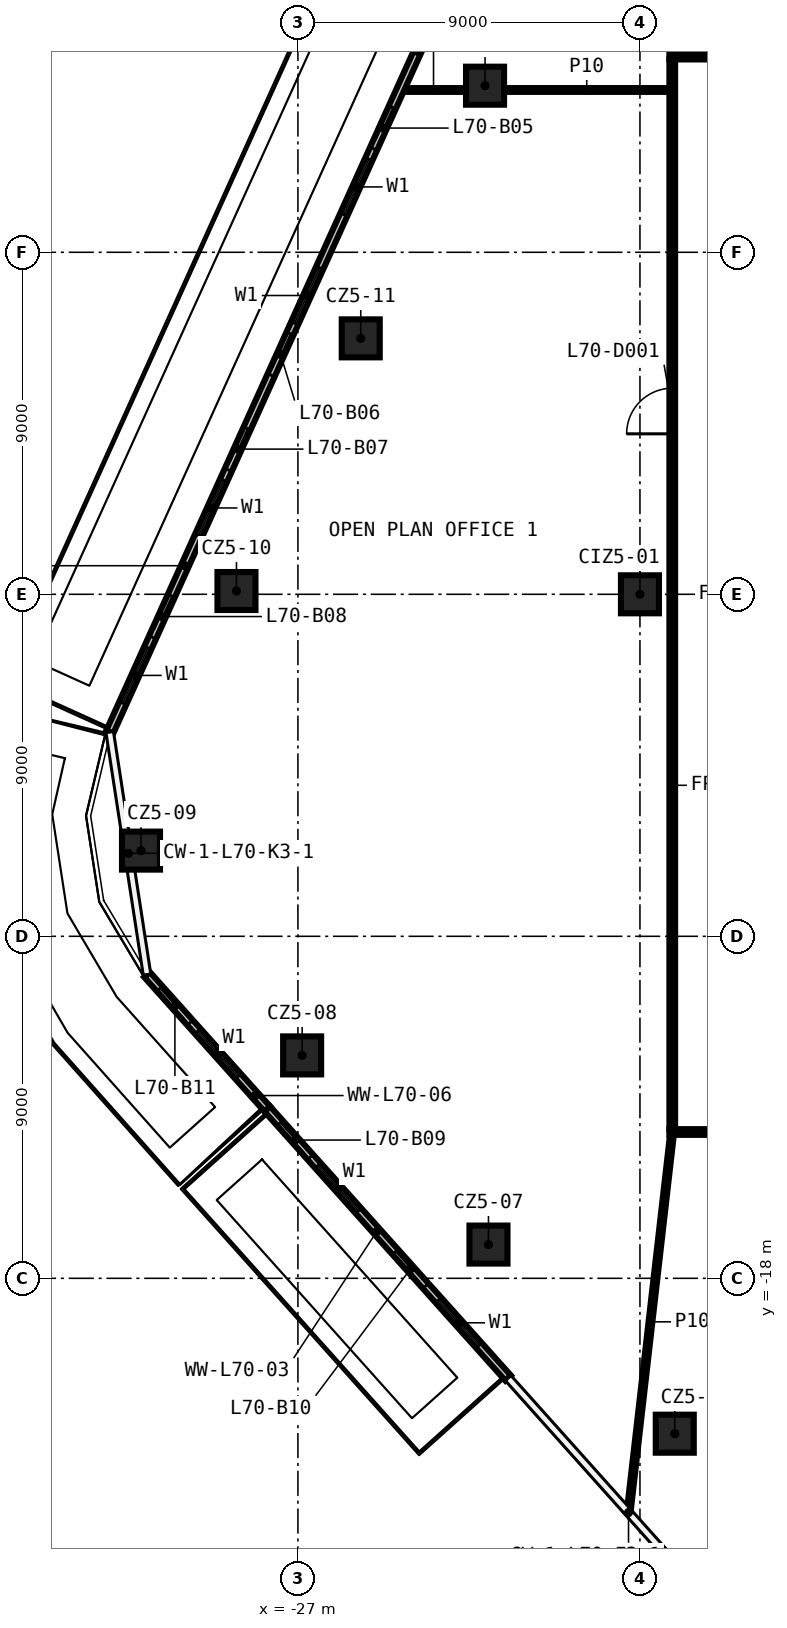
"""IFC4 building model, lengths in metres.
Left out: names, types, materials, properties, quantities, classifications, styles, units other than length and angle.
Written with IfcOpenShell. Run it as: python <this file> out.ifc"""

import sys

from ifc_helpers import new_model, si_unit, direction, frame, frame_2d, origin, origin_2d, place, context, subcontext, project, spatial, rectangle, extrude, element, fill, save


model = new_model("IFC4")
c1 = context("Model", 3, precision=1e-05, world=origin(), true_north=direction((0.0, 1.0)))
c2 = subcontext(c1, "Body", "Model", "MODEL_VIEW")
j1 = project(units=[si_unit("LENGTHUNIT", "METRE"), si_unit("PLANEANGLEUNIT", "RADIAN")], contexts=[c1])
p1 = place(None, origin())
s1 = spatial("IfcSite", under=j1, at=p1, CompositionType="ELEMENT")
p2 = place(p1, origin())
s2 = spatial("IfcBuilding", under=s1, at=p2, CompositionType="ELEMENT")
p3 = place(p2, frame((0.0, 0.0, 327.8)))
s3 = spatial("IfcBuildingStorey", under=s2, at=p3, CompositionType="ELEMENT", Elevation=327.8)
for number, where, z_axis, x_axis in (
    (1, (-17.084, -22.089, 0.0), (0.0, 0.0, 1.0), (1.0, 0.0, 0.0)),
    (2, (-21.986, -17.112, 0.0), (0.0, 0.0, 1.0), (1.0, 0.0, 0.0)),
    (3, (-26.889, -12.134, 0.0), (0.0, 0.0, 1.0), (1.0, 0.0, 0.0)),
    (4, (-31.129, -6.745, 0.0), (0.0, 0.0, 1.0), (1.0, 0.0, 0.0)),
    (5, (-28.617, 0.086, 0.0), (0.0, 0.0, 1.0), (1.0, 0.0, 0.0)),
    (6, (-25.347, 6.735, 0.0), (0.0, 0.0, 1.0), (1.0, 0.0, 0.0)),
    (7, (-22.076, 13.384, 0.0), (0.0, 0.0, 1.0), (1.0, 0.0, 0.0)),
    (8, (-18.0, 0.0, 0.0), (0.0, 0.0, 1.0), (1.0, 0.0, 0.0)),
):
    element("IfcColumn", number, at=place(p3, frame(where, z_axis=z_axis, x_axis=x_axis)), inside=s3, PredefinedType="COLUMN", context=c2, shape_type="SweptSolid", body=[
        extrude(rectangle(XDim=1.0, YDim=1.0, at=origin_2d()), origin(), (0.0, 0.0, 1.0), 3.82),
    ])
p4 = place(p3, frame((17.225, -14.15, 0.0), z_axis=(0.0, 0.0, 1.0), x_axis=(-1.0, 0.0, 0.0)))
e9 = element("IfcWall", 9, at=p4, inside=s3, PredefinedType="PARTITIONING", context=c2, shape_type="SweptSolid", body=[
    extrude(rectangle(XDim=34.45, YDim=0.15, at=frame_2d((17.225, 0.0))), origin(), (0.0, 0.0, 1.0), 3.82),
])
p5 = place(p4, frame((17.711, 0.0, 0.0)))
e10 = element("IfcOpeningElement", 10, at=p5, cuts=e9, PredefinedType="OPENING", context=c2, shape_type="SweptSolid", body=[
    extrude(rectangle(XDim=1.2, YDim=2.1, at=frame_2d((0.6, 1.05))), frame((0.0, 0.085, 0.0), z_axis=(0.0, -1.0, 0.0), x_axis=(1.0, 0.0, 0.0)), (0.0, 0.0, 1.0), 0.17),
])
p6 = place(p4, frame((4.094, 0.0, 0.0)))
e11 = element("IfcOpeningElement", 11, at=p6, cuts=e9, PredefinedType="OPENING", context=c2, shape_type="SweptSolid", body=[
    extrude(rectangle(XDim=1.2, YDim=2.1, at=frame_2d((0.6, 1.05))), frame((0.0, 0.085, 0.0), z_axis=(0.0, -1.0, 0.0), x_axis=(1.0, 0.0, 0.0)), (0.0, 0.0, 1.0), 0.17),
])
p7 = place(p3, frame((-24.288, 13.271, 0.0), z_axis=(0.0, 0.0, 1.0), x_axis=(1.0, 0.0, 0.0)))
e12 = element("IfcWall", 12, at=p7, inside=s3, PredefinedType="PARTITIONING", context=c2, shape_type="SweptSolid", body=[
    extrude(rectangle(XDim=1.712, YDim=0.1, at=frame_2d((0.856, 0.0))), origin(), (0.0, 0.0, 1.0), 3.82),
])
p8 = place(p3, frame((-21.576, 13.271, 0.0), z_axis=(0.0, 0.0, 1.0), x_axis=(1.0, 0.0, 0.0)))
e13 = element("IfcWall", 13, at=p8, inside=s3, PredefinedType="PARTITIONING", context=c2, shape_type="SweptSolid", body=[
    extrude(rectangle(XDim=4.351, YDim=0.1, at=frame_2d((2.175, 0.0))), origin(), (0.0, 0.0, 1.0), 3.82),
])
p9 = place(p3, frame((-17.225, 14.15, 0.0), z_axis=(0.0, 0.0, 1.0), x_axis=(1.0, 0.0, 0.0)))
e14 = element("IfcWall", 14, at=p9, inside=s3, PredefinedType="PARTITIONING", context=c2, shape_type="SweptSolid", body=[
    extrude(rectangle(XDim=34.45, YDim=0.15, at=frame_2d((17.225, 0.0))), origin(), (0.0, 0.0, 1.0), 3.82),
])
p10 = place(p9, frame((17.706, 0.0, 0.0)))
e15 = element("IfcOpeningElement", 15, at=p10, cuts=e14, PredefinedType="OPENING", context=c2, shape_type="SweptSolid", body=[
    extrude(rectangle(XDim=1.2, YDim=2.1, at=frame_2d((0.6, 1.05))), frame((0.0, 0.085, 0.0), z_axis=(0.0, -1.0, 0.0), x_axis=(1.0, 0.0, 0.0)), (0.0, 0.0, 1.0), 0.17),
])
p11 = place(p3, frame((-18.296, -24.14, 0.0), z_axis=(0.0, 0.0, 1.0), x_axis=(0.11391359401, 0.993490660801, 0.0)))
e16 = element("IfcWall", 16, at=p11, inside=s3, PredefinedType="PARTITIONING", context=c2, shape_type="SweptSolid", body=[
    extrude(rectangle(XDim=10.056, YDim=0.1, at=frame_2d((5.028, 0.0))), origin(), (0.0, 0.0, 1.0), 3.82),
])
p12 = place(p3, frame((-17.15, -14.075, 0.0), z_axis=(0.0, 0.0, 1.0), x_axis=(0.0, 1.0, 0.0)))
e17 = element("IfcWall", 17, at=p12, inside=s3, PredefinedType="PARTITIONING", context=c2, shape_type="SweptSolid", body=[
    extrude(rectangle(XDim=28.15, YDim=0.15, at=frame_2d((14.075, 0.0))), origin(), (0.0, 0.0, 1.0), 3.82),
])
p13 = place(p12, frame((18.298, 0.0, 0.0)))
e18 = element("IfcOpeningElement", 18, at=p13, cuts=e17, PredefinedType="OPENING", context=c2, shape_type="SweptSolid", body=[
    extrude(rectangle(XDim=1.2, YDim=2.1, at=frame_2d((0.6, 1.05))), frame((0.0, 0.085, 0.0), z_axis=(0.0, -1.0, 0.0), x_axis=(1.0, 0.0, 0.0)), (0.0, 0.0, 1.0), 0.17),
])
p14 = place(p3, frame((-22.399, 17.495, 0.0), z_axis=(0.0, 0.0, 1.0), x_axis=(-0.412123946496, -0.911127791654, 0.0)))
e19 = element("IfcWall", 19, at=p14, inside=s3, PredefinedType="SOLIDWALL", context=c2, shape_type="SweptSolid", body=[
    extrude(rectangle(XDim=23.18, YDim=0.2, at=frame_2d((11.59, 0.0))), origin(), (0.0, 0.0, 1.0), 3.82),
])
p15 = place(p14, frame((2.0, 0.0, 0.6)))
e20 = element("IfcOpeningElement", 20, at=p15, cuts=e19, PredefinedType="OPENING", context=c2, shape_type="SweptSolid", body=[
    extrude(rectangle(XDim=1.6, YDim=2.4, at=frame_2d((0.8, 1.2))), frame((0.0, 0.11, 0.0), z_axis=(0.0, -1.0, 0.0), x_axis=(1.0, 0.0, 0.0)), (0.0, 0.0, 1.0), 0.22),
])
p16 = place(p14, frame((0.5, 0.0, 0.0)))
e21 = element("IfcOpeningElement", 21, at=p16, cuts=e19, PredefinedType="OPENING", context=c2, shape_type="SweptSolid", body=[
    extrude(rectangle(XDim=1.2, YDim=2.4, at=frame_2d((0.6, 1.2))), frame((0.0, 0.11, 0.0), z_axis=(0.0, -1.0, 0.0), x_axis=(1.0, 0.0, 0.0)), (0.0, 0.0, 1.0), 0.22),
])
p17 = place(p14, frame((6.636, 0.0, 0.6)))
e22 = element("IfcOpeningElement", 22, at=p17, cuts=e19, PredefinedType="OPENING", context=c2, shape_type="SweptSolid", body=[
    extrude(rectangle(XDim=1.6, YDim=2.4, at=frame_2d((0.8, 1.2))), frame((0.0, 0.11, 0.0), z_axis=(0.0, -1.0, 0.0), x_axis=(1.0, 0.0, 0.0)), (0.0, 0.0, 1.0), 0.22),
])
p18 = place(p14, frame((5.136, 0.0, 0.0)))
e23 = element("IfcOpeningElement", 23, at=p18, cuts=e19, PredefinedType="OPENING", context=c2, shape_type="SweptSolid", body=[
    extrude(rectangle(XDim=1.2, YDim=2.4, at=frame_2d((0.6, 1.2))), frame((0.0, 0.11, 0.0), z_axis=(0.0, -1.0, 0.0), x_axis=(1.0, 0.0, 0.0)), (0.0, 0.0, 1.0), 0.22),
])
p19 = place(p14, frame((9.772, 0.0, 0.6)))
e24 = element("IfcOpeningElement", 24, at=p19, cuts=e19, PredefinedType="OPENING", context=c2, shape_type="SweptSolid", body=[
    extrude(rectangle(XDim=1.6, YDim=2.4, at=frame_2d((0.8, 1.2))), frame((0.0, 0.11, 0.0), z_axis=(0.0, -1.0, 0.0), x_axis=(1.0, 0.0, 0.0)), (0.0, 0.0, 1.0), 0.22),
])
p20 = place(p14, frame((11.672, 0.0, 0.0)))
e25 = element("IfcOpeningElement", 25, at=p20, cuts=e19, PredefinedType="OPENING", context=c2, shape_type="SweptSolid", body=[
    extrude(rectangle(XDim=1.2, YDim=2.4, at=frame_2d((0.6, 1.2))), frame((0.0, 0.11, 0.0), z_axis=(0.0, -1.0, 0.0), x_axis=(1.0, 0.0, 0.0)), (0.0, 0.0, 1.0), 0.22),
])
p21 = place(p14, frame((15.908, 0.0, 0.6)))
e26 = element("IfcOpeningElement", 26, at=p21, cuts=e19, PredefinedType="OPENING", context=c2, shape_type="SweptSolid", body=[
    extrude(rectangle(XDim=1.6, YDim=2.4, at=frame_2d((0.8, 1.2))), frame((0.0, 0.11, 0.0), z_axis=(0.0, -1.0, 0.0), x_axis=(1.0, 0.0, 0.0)), (0.0, 0.0, 1.0), 0.22),
])
p22 = place(p14, frame((14.408, 0.0, 0.0)))
e27 = element("IfcOpeningElement", 27, at=p22, cuts=e19, PredefinedType="OPENING", context=c2, shape_type="SweptSolid", body=[
    extrude(rectangle(XDim=1.2, YDim=2.4, at=frame_2d((0.6, 1.2))), frame((0.0, 0.11, 0.0), z_axis=(0.0, -1.0, 0.0), x_axis=(1.0, 0.0, 0.0)), (0.0, 0.0, 1.0), 0.22),
])
p23 = place(p14, frame((20.744, 0.0, 0.6)))
e28 = element("IfcOpeningElement", 28, at=p23, cuts=e19, PredefinedType="OPENING", context=c2, shape_type="SweptSolid", body=[
    extrude(rectangle(XDim=1.6, YDim=2.4, at=frame_2d((0.8, 1.2))), frame((0.0, 0.11, 0.0), z_axis=(0.0, -1.0, 0.0), x_axis=(1.0, 0.0, 0.0)), (0.0, 0.0, 1.0), 0.22),
])
p24 = place(p14, frame((19.244, 0.0, 0.0)))
e29 = element("IfcOpeningElement", 29, at=p24, cuts=e19, PredefinedType="OPENING", context=c2, shape_type="SweptSolid", body=[
    extrude(rectangle(XDim=1.2, YDim=2.4, at=frame_2d((0.6, 1.2))), frame((0.0, 0.11, 0.0), z_axis=(0.0, -1.0, 0.0), x_axis=(1.0, 0.0, 0.0)), (0.0, 0.0, 1.0), 0.22),
])
p25 = place(p3, frame((-27.807, -13.542, 0.0), z_axis=(0.0, 0.0, 1.0), x_axis=(0.666894702572, -0.745151968179, 0.0)))
e30 = element("IfcWall", 30, at=p25, inside=s3, PredefinedType="SOLIDWALL", context=c2, shape_type="SweptSolid", body=[
    extrude(rectangle(XDim=9.506, YDim=0.2, at=frame_2d((4.753, 0.0))), origin(), (0.0, 0.0, 1.0), 3.82),
])
p26 = place(p25, frame((2.0, 0.0, 0.6)))
e31 = element("IfcOpeningElement", 31, at=p26, cuts=e30, PredefinedType="OPENING", context=c2, shape_type="SweptSolid", body=[
    extrude(rectangle(XDim=1.6, YDim=2.4, at=frame_2d((0.8, 1.2))), frame((0.0, 0.11, 0.0), z_axis=(0.0, -1.0, 0.0), x_axis=(1.0, 0.0, 0.0)), (0.0, 0.0, 1.0), 0.22),
])
p27 = place(p25, frame((0.5, 0.0, 0.0)))
e32 = element("IfcOpeningElement", 32, at=p27, cuts=e30, PredefinedType="OPENING", context=c2, shape_type="SweptSolid", body=[
    extrude(rectangle(XDim=1.2, YDim=2.4, at=frame_2d((0.6, 1.2))), frame((0.0, 0.11, 0.0), z_axis=(0.0, -1.0, 0.0), x_axis=(1.0, 0.0, 0.0)), (0.0, 0.0, 1.0), 0.22),
])
p28 = place(p25, frame((6.753, 0.0, 0.6)))
e33 = element("IfcOpeningElement", 33, at=p28, cuts=e30, PredefinedType="OPENING", context=c2, shape_type="SweptSolid", body=[
    extrude(rectangle(XDim=1.6, YDim=2.4, at=frame_2d((0.8, 1.2))), frame((0.0, 0.11, 0.0), z_axis=(0.0, -1.0, 0.0), x_axis=(1.0, 0.0, 0.0)), (0.0, 0.0, 1.0), 0.22),
])
p29 = place(p25, frame((5.053, 0.0, 0.0)))
e34 = element("IfcOpeningElement", 34, at=p29, cuts=e30, PredefinedType="OPENING", context=c2, shape_type="SweptSolid", body=[
    extrude(rectangle(XDim=1.2, YDim=2.4, at=frame_2d((0.6, 1.2))), frame((0.0, 0.11, 0.0), z_axis=(0.0, -1.0, 0.0), x_axis=(1.0, 0.0, 0.0)), (0.0, 0.0, 1.0), 0.22),
])
p30 = place(p3, frame((-30.97, -10.007, 0.0), z_axis=(0.0, 0.0, 1.0), x_axis=(0.666852029375, -0.745190157556, 0.0)))
e35 = element("IfcWall", 35, at=p30, inside=s3, PredefinedType="SOLIDWALL", context=c2, shape_type="SweptSolid", body=[
    extrude(rectangle(XDim=4.743, YDim=0.2, at=frame_2d((2.372, 0.0))), origin(), (0.0, 0.0, 1.0), 3.82),
])
p31 = place(p30, frame((2.0, 0.0, 0.6)))
e36 = element("IfcOpeningElement", 36, at=p31, cuts=e35, PredefinedType="OPENING", context=c2, shape_type="SweptSolid", body=[
    extrude(rectangle(XDim=1.6, YDim=2.4, at=frame_2d((0.8, 1.2))), frame((0.0, 0.11, 0.0), z_axis=(0.0, -1.0, 0.0), x_axis=(1.0, 0.0, 0.0)), (0.0, 0.0, 1.0), 0.22),
])
p32 = place(p30, frame((0.5, 0.0, 0.0)))
e37 = element("IfcOpeningElement", 37, at=p32, cuts=e35, PredefinedType="OPENING", context=c2, shape_type="SweptSolid", body=[
    extrude(rectangle(XDim=1.2, YDim=2.4, at=frame_2d((0.6, 1.2))), frame((0.0, 0.11, 0.0), z_axis=(0.0, -1.0, 0.0), x_axis=(1.0, 0.0, 0.0)), (0.0, 0.0, 1.0), 0.22),
])
p33 = place(p13, origin())
e38 = element("IfcDoor", 38, at=p33, inside=s3, OperationType="SINGLE_SWING_RIGHT", PredefinedType="DOOR", context=c2, shape_type="SweptSolid", body=[
    extrude(rectangle(XDim=1.2, YDim=2.1, at=frame_2d((0.6, 1.05))), frame((0.0, 0.025, 0.0), z_axis=(0.0, -1.0, 0.0), x_axis=(1.0, 0.0, 0.0)), (0.0, 0.0, 1.0), 0.05),
])
fill(e18, e38)
p34 = place(p15, origin())
e39 = element("IfcWindow", 39, at=p34, inside=s3, PartitioningType="SINGLE_PANEL", PredefinedType="WINDOW", context=c2, shape_type="SweptSolid", body=[
    extrude(rectangle(XDim=1.6, YDim=2.4, at=frame_2d((0.8, 1.2))), frame((0.0, 0.03, 0.0), z_axis=(0.0, -1.0, 0.0), x_axis=(1.0, 0.0, 0.0)), (0.0, 0.0, 1.0), 0.06),
])
fill(e20, e39)
p35 = place(p17, origin())
e40 = element("IfcWindow", 40, at=p35, inside=s3, PartitioningType="SINGLE_PANEL", PredefinedType="WINDOW", context=c2, shape_type="SweptSolid", body=[
    extrude(rectangle(XDim=1.6, YDim=2.4, at=frame_2d((0.8, 1.2))), frame((0.0, 0.03, 0.0), z_axis=(0.0, -1.0, 0.0), x_axis=(1.0, 0.0, 0.0)), (0.0, 0.0, 1.0), 0.06),
])
fill(e22, e40)
p36 = place(p18, origin())
e41 = element("IfcDoor", 41, at=p36, inside=s3, OperationType="SLIDING_TO_LEFT", PredefinedType="DOOR", context=c2, shape_type="SweptSolid", body=[
    extrude(rectangle(XDim=1.2, YDim=2.4, at=frame_2d((0.6, 1.2))), frame((0.0, 0.025, 0.0), z_axis=(0.0, -1.0, 0.0), x_axis=(1.0, 0.0, 0.0)), (0.0, 0.0, 1.0), 0.05),
])
fill(e23, e41)
p37 = place(p19, origin())
e42 = element("IfcWindow", 42, at=p37, inside=s3, PartitioningType="SINGLE_PANEL", PredefinedType="WINDOW", context=c2, shape_type="SweptSolid", body=[
    extrude(rectangle(XDim=1.6, YDim=2.4, at=frame_2d((0.8, 1.2))), frame((0.0, 0.03, 0.0), z_axis=(0.0, -1.0, 0.0), x_axis=(1.0, 0.0, 0.0)), (0.0, 0.0, 1.0), 0.06),
])
fill(e24, e42)
p38 = place(p20, origin())
e43 = element("IfcDoor", 43, at=p38, inside=s3, OperationType="SLIDING_TO_LEFT", PredefinedType="DOOR", context=c2, shape_type="SweptSolid", body=[
    extrude(rectangle(XDim=1.2, YDim=2.4, at=frame_2d((0.6, 1.2))), frame((0.0, 0.025, 0.0), z_axis=(0.0, -1.0, 0.0), x_axis=(1.0, 0.0, 0.0)), (0.0, 0.0, 1.0), 0.05),
])
fill(e25, e43)
p39 = place(p21, origin())
e44 = element("IfcWindow", 44, at=p39, inside=s3, PartitioningType="SINGLE_PANEL", PredefinedType="WINDOW", context=c2, shape_type="SweptSolid", body=[
    extrude(rectangle(XDim=1.6, YDim=2.4, at=frame_2d((0.8, 1.2))), frame((0.0, 0.03, 0.0), z_axis=(0.0, -1.0, 0.0), x_axis=(1.0, 0.0, 0.0)), (0.0, 0.0, 1.0), 0.06),
])
fill(e26, e44)
p40 = place(p22, origin())
e45 = element("IfcDoor", 45, at=p40, inside=s3, OperationType="SLIDING_TO_LEFT", PredefinedType="DOOR", context=c2, shape_type="SweptSolid", body=[
    extrude(rectangle(XDim=1.2, YDim=2.4, at=frame_2d((0.6, 1.2))), frame((0.0, 0.025, 0.0), z_axis=(0.0, -1.0, 0.0), x_axis=(1.0, 0.0, 0.0)), (0.0, 0.0, 1.0), 0.05),
])
fill(e27, e45)
p41 = place(p23, origin())
e46 = element("IfcWindow", 46, at=p41, inside=s3, PartitioningType="SINGLE_PANEL", PredefinedType="WINDOW", context=c2, shape_type="SweptSolid", body=[
    extrude(rectangle(XDim=1.6, YDim=2.4, at=frame_2d((0.8, 1.2))), frame((0.0, 0.03, 0.0), z_axis=(0.0, -1.0, 0.0), x_axis=(1.0, 0.0, 0.0)), (0.0, 0.0, 1.0), 0.06),
])
fill(e28, e46)
p42 = place(p24, origin())
e47 = element("IfcDoor", 47, at=p42, inside=s3, OperationType="SLIDING_TO_LEFT", PredefinedType="DOOR", context=c2, shape_type="SweptSolid", body=[
    extrude(rectangle(XDim=1.2, YDim=2.4, at=frame_2d((0.6, 1.2))), frame((0.0, 0.025, 0.0), z_axis=(0.0, -1.0, 0.0), x_axis=(1.0, 0.0, 0.0)), (0.0, 0.0, 1.0), 0.05),
])
fill(e29, e47)
p43 = place(p26, origin())
e48 = element("IfcWindow", 48, at=p43, inside=s3, PartitioningType="SINGLE_PANEL", PredefinedType="WINDOW", context=c2, shape_type="SweptSolid", body=[
    extrude(rectangle(XDim=1.6, YDim=2.4, at=frame_2d((0.8, 1.2))), frame((0.0, 0.03, 0.0), z_axis=(0.0, -1.0, 0.0), x_axis=(1.0, 0.0, 0.0)), (0.0, 0.0, 1.0), 0.06),
])
fill(e31, e48)
p44 = place(p27, origin())
e49 = element("IfcDoor", 49, at=p44, inside=s3, OperationType="SLIDING_TO_LEFT", PredefinedType="DOOR", context=c2, shape_type="SweptSolid", body=[
    extrude(rectangle(XDim=1.2, YDim=2.4, at=frame_2d((0.6, 1.2))), frame((0.0, 0.025, 0.0), z_axis=(0.0, -1.0, 0.0), x_axis=(1.0, 0.0, 0.0)), (0.0, 0.0, 1.0), 0.05),
])
fill(e32, e49)
p45 = place(p28, origin())
e50 = element("IfcWindow", 50, at=p45, inside=s3, PartitioningType="SINGLE_PANEL", PredefinedType="WINDOW", context=c2, shape_type="SweptSolid", body=[
    extrude(rectangle(XDim=1.6, YDim=2.4, at=frame_2d((0.8, 1.2))), frame((0.0, 0.03, 0.0), z_axis=(0.0, -1.0, 0.0), x_axis=(1.0, 0.0, 0.0)), (0.0, 0.0, 1.0), 0.06),
])
fill(e33, e50)
p46 = place(p29, origin())
e51 = element("IfcDoor", 51, at=p46, inside=s3, OperationType="SLIDING_TO_LEFT", PredefinedType="DOOR", context=c2, shape_type="SweptSolid", body=[
    extrude(rectangle(XDim=1.2, YDim=2.4, at=frame_2d((0.6, 1.2))), frame((0.0, 0.025, 0.0), z_axis=(0.0, -1.0, 0.0), x_axis=(1.0, 0.0, 0.0)), (0.0, 0.0, 1.0), 0.05),
])
fill(e34, e51)
p47 = place(p31, origin())
e52 = element("IfcWindow", 52, at=p47, inside=s3, PartitioningType="SINGLE_PANEL", PredefinedType="WINDOW", context=c2, shape_type="SweptSolid", body=[
    extrude(rectangle(XDim=1.6, YDim=2.4, at=frame_2d((0.8, 1.2))), frame((0.0, 0.03, 0.0), z_axis=(0.0, -1.0, 0.0), x_axis=(1.0, 0.0, 0.0)), (0.0, 0.0, 1.0), 0.06),
])
fill(e36, e52)
p48 = place(p32, origin())
e53 = element("IfcDoor", 53, at=p48, inside=s3, OperationType="SLIDING_TO_LEFT", PredefinedType="DOOR", context=c2, shape_type="SweptSolid", body=[
    extrude(rectangle(XDim=1.2, YDim=2.4, at=frame_2d((0.6, 1.2))), frame((0.0, 0.025, 0.0), z_axis=(0.0, -1.0, 0.0), x_axis=(1.0, 0.0, 0.0)), (0.0, 0.0, 1.0), 0.05),
])
fill(e37, e53)
save(model, sys.argv[1])
